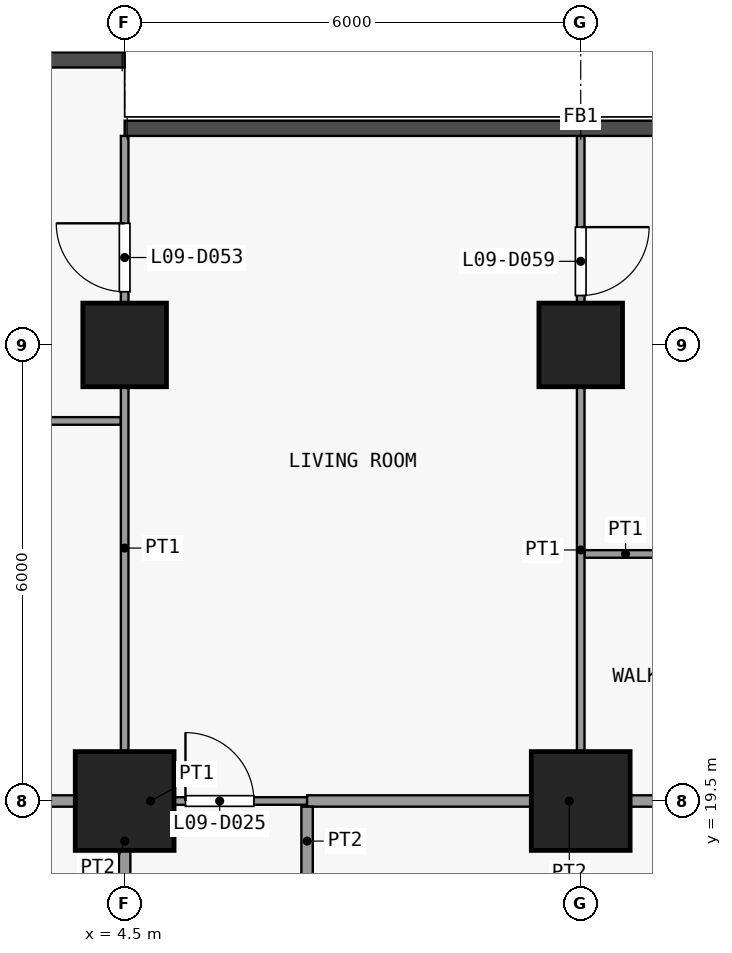
"""IFC4 building model, lengths in metres.
Left out: names, types, materials, properties, quantities, classifications, styles, units other than length and angle.
Written with IfcOpenShell. Run it as: python <this file> out.ifc"""

import sys

from ifc_helpers import new_model, si_unit, direction, frame, frame_2d, origin, origin_2d, place, context, subcontext, project, spatial, rectangle, extrude, element, fill, save


model = new_model("IFC4")
c1 = context("Model", 3, precision=1e-05, world=origin(), true_north=direction((0.0, 1.0)))
c2 = subcontext(c1, "Body", "Model", "MODEL_VIEW")
j1 = project(units=[si_unit("LENGTHUNIT", "METRE"), si_unit("PLANEANGLEUNIT", "RADIAN")], contexts=[c1])
p1 = place(None, origin())
s1 = spatial("IfcSite", under=j1, at=p1, CompositionType="ELEMENT")
p2 = place(p1, origin())
s2 = spatial("IfcBuilding", under=s1, at=p2, CompositionType="ELEMENT")
p3 = place(p2, frame((0.0, 0.0, 43.3)))
s3 = spatial("IfcBuildingStorey", under=s2, at=p3, CompositionType="ELEMENT", Elevation=43.3)
p4 = place(p3, frame((4.5, 19.5, 0.0), z_axis=(0.0, 0.0, 1.0), x_axis=(1.0, 0.0, 0.0)))
e1 = element("IfcColumn", 1, at=p4, inside=s3, PredefinedType="COLUMN", context=c2, shape_type="SweptSolid", body=[
    extrude(rectangle(XDim=1.3, YDim=1.3, at=origin_2d()), origin(), (0.0, 0.0, 1.0), 3.6),
])
p5 = place(p3, frame((4.5, 25.5, 0.0), z_axis=(0.0, 0.0, 1.0), x_axis=(1.0, 0.0, 0.0)))
e2 = element("IfcColumn", 2, at=p5, inside=s3, PredefinedType="COLUMN", context=c2, shape_type="SweptSolid", body=[
    extrude(rectangle(XDim=1.1, YDim=1.1, at=origin_2d()), origin(), (0.0, 0.0, 1.0), 3.6),
])
p6 = place(p3, frame((10.5, 19.5, 0.0), z_axis=(0.0, 0.0, 1.0), x_axis=(1.0, 0.0, 0.0)))
e3 = element("IfcColumn", 3, at=p6, inside=s3, PredefinedType="COLUMN", context=c2, shape_type="SweptSolid", body=[
    extrude(rectangle(XDim=1.3, YDim=1.3, at=origin_2d()), origin(), (0.0, 0.0, 1.0), 3.6),
])
p7 = place(p3, frame((10.5, 25.5, 0.0), z_axis=(0.0, 0.0, 1.0), x_axis=(1.0, 0.0, 0.0)))
e4 = element("IfcColumn", 4, at=p7, inside=s3, PredefinedType="COLUMN", context=c2, shape_type="SweptSolid", body=[
    extrude(rectangle(XDim=1.1, YDim=1.1, at=origin_2d()), origin(), (0.0, 0.0, 1.0), 3.6),
])
p8 = place(p3, frame((4.5, 19.5, 0.0), z_axis=(0.0, 0.0, 1.0), x_axis=(1.0, 0.0, 0.0)))
e5 = element("IfcWall", 5, at=p8, inside=s3, PredefinedType="PARTITIONING", context=c2, shape_type="SweptSolid", body=[
    extrude(rectangle(XDim=2.4, YDim=0.1, at=frame_2d((1.2, 0.0))), origin(), (0.0, 0.0, 1.0), 3.3),
])
p9 = place(p8, frame((0.8, 0.0, 0.0)))
e6 = element("IfcOpeningElement", 6, at=p9, cuts=e5, PredefinedType="OPENING", context=c2, shape_type="SweptSolid", body=[
    extrude(rectangle(XDim=0.9, YDim=2.1, at=frame_2d((0.45, 1.05))), frame((0.0, 0.06, 0.0), z_axis=(0.0, -1.0, 0.0), x_axis=(1.0, 0.0, 0.0)), (0.0, 0.0, 1.0), 0.12),
])
p10 = place(p3, frame((-2.75, 19.5, 0.0), z_axis=(0.0, 0.0, 1.0), x_axis=(1.0, 0.0, 0.0)))
e7 = element("IfcWall", 7, at=p10, inside=s3, PredefinedType="PARTITIONING", context=c2, shape_type="SweptSolid", body=[
    extrude(rectangle(XDim=7.25, YDim=0.15, at=frame_2d((3.625, 0.0))), origin(), (0.0, 0.0, 1.0), 3.3),
])
p11 = place(p3, frame((6.9, 19.5, 0.0), z_axis=(0.0, 0.0, 1.0), x_axis=(1.0, 0.0, 0.0)))
e8 = element("IfcWall", 8, at=p11, inside=s3, PredefinedType="PARTITIONING", context=c2, shape_type="SweptSolid", body=[
    extrude(rectangle(XDim=6.9, YDim=0.15, at=frame_2d((3.45, 0.0))), origin(), (0.0, 0.0, 1.0), 3.3),
])
p12 = place(p3, frame((10.55, 22.75, 0.0), z_axis=(0.0, 0.0, 1.0), x_axis=(1.0, 0.0, 0.0)))
e9 = element("IfcWall", 9, at=p12, inside=s3, PredefinedType="PARTITIONING", context=c2, shape_type="SweptSolid", body=[
    extrude(rectangle(XDim=3.25, YDim=0.1, at=frame_2d((1.625, 0.0))), origin(), (0.0, 0.0, 1.0), 3.3),
])
p13 = place(p12, frame((1.2, 0.0, 0.0)))
e10 = element("IfcOpeningElement", 10, at=p13, cuts=e9, PredefinedType="OPENING", context=c2, shape_type="SweptSolid", body=[
    extrude(rectangle(XDim=0.9, YDim=2.1, at=frame_2d((0.45, 1.05))), frame((0.0, 0.06, 0.0), z_axis=(0.0, -1.0, 0.0), x_axis=(1.0, 0.0, 0.0)), (0.0, 0.0, 1.0), 0.12),
])
p14 = place(p3, frame((-4.4, 24.5, 0.0), z_axis=(0.0, 0.0, 1.0), x_axis=(1.0, 0.0, 0.0)))
e11 = element("IfcWall", 11, at=p14, inside=s3, PredefinedType="PARTITIONING", context=c2, shape_type="SweptSolid", body=[
    extrude(rectangle(XDim=8.85, YDim=0.1, at=frame_2d((4.425, 0.0))), origin(), (0.0, 0.0, 1.0), 3.3),
])
p15 = place(p14, frame((4.0, 0.0, 0.0)))
e12 = element("IfcOpeningElement", 12, at=p15, cuts=e11, PredefinedType="OPENING", context=c2, shape_type="SweptSolid", body=[
    extrude(rectangle(XDim=0.9, YDim=2.1, at=frame_2d((0.45, 1.05))), frame((0.0, 0.06, 0.0), z_axis=(0.0, -1.0, 0.0), x_axis=(1.0, 0.0, 0.0)), (0.0, 0.0, 1.0), 0.12),
])
p16 = place(p3, frame((4.5, 19.575, 0.0), z_axis=(0.0, 0.0, 1.0), x_axis=(0.0, 1.0, 0.0)))
e13 = element("IfcWall", 13, at=p16, inside=s3, PredefinedType="PARTITIONING", context=c2, shape_type="SweptSolid", body=[
    extrude(rectangle(XDim=8.675, YDim=0.1, at=frame_2d((4.337, 0.0))), origin(), (0.0, 0.0, 1.0), 3.3),
])
p17 = place(p16, frame((6.625, 0.0, 0.0)))
e14 = element("IfcOpeningElement", 14, at=p17, cuts=e13, PredefinedType="OPENING", context=c2, shape_type="SweptSolid", body=[
    extrude(rectangle(XDim=0.9, YDim=2.1, at=frame_2d((0.45, 1.05))), frame((0.0, 0.06, 0.0), z_axis=(0.0, -1.0, 0.0), x_axis=(1.0, 0.0, 0.0)), (0.0, 0.0, 1.0), 0.12),
])
p18 = place(p3, frame((4.5, 16.6, 0.0), z_axis=(0.0, 0.0, 1.0), x_axis=(0.0, 1.0, 0.0)))
e15 = element("IfcWall", 15, at=p18, inside=s3, PredefinedType="PARTITIONING", context=c2, shape_type="SweptSolid", body=[
    extrude(rectangle(XDim=2.825, YDim=0.15, at=frame_2d((1.413, 0.0))), origin(), (0.0, 0.0, 1.0), 3.3),
])
p19 = place(p18, frame((0.9, 0.0, 0.0)))
e16 = element("IfcOpeningElement", 16, at=p19, cuts=e15, PredefinedType="OPENING", context=c2, shape_type="SweptSolid", body=[
    extrude(rectangle(XDim=0.9, YDim=2.1, at=frame_2d((0.45, 1.05))), frame((0.0, 0.085, 0.0), z_axis=(0.0, -1.0, 0.0), x_axis=(1.0, 0.0, 0.0)), (0.0, 0.0, 1.0), 0.17),
])
p20 = place(p3, frame((6.9, 16.6, 0.0), z_axis=(0.0, 0.0, 1.0), x_axis=(0.0, 1.0, 0.0)))
e17 = element("IfcWall", 17, at=p20, inside=s3, PredefinedType="PARTITIONING", context=c2, shape_type="SweptSolid", body=[
    extrude(rectangle(XDim=2.825, YDim=0.15, at=frame_2d((1.413, 0.0))), origin(), (0.0, 0.0, 1.0), 3.3),
])
p21 = place(p20, frame((0.9, 0.0, 0.0)))
e18 = element("IfcOpeningElement", 18, at=p21, cuts=e17, PredefinedType="OPENING", context=c2, shape_type="SweptSolid", body=[
    extrude(rectangle(XDim=0.9, YDim=2.1, at=frame_2d((0.45, 1.05))), frame((0.0, 0.085, 0.0), z_axis=(0.0, -1.0, 0.0), x_axis=(1.0, 0.0, 0.0)), (0.0, 0.0, 1.0), 0.17),
])
p22 = place(p3, frame((10.5, 19.575, 0.0), z_axis=(0.0, 0.0, 1.0), x_axis=(0.0, 1.0, 0.0)))
e19 = element("IfcWall", 19, at=p22, inside=s3, PredefinedType="PARTITIONING", context=c2, shape_type="SweptSolid", body=[
    extrude(rectangle(XDim=8.675, YDim=0.1, at=frame_2d((4.337, 0.0))), origin(), (0.0, 0.0, 1.0), 3.3),
])
p23 = place(p22, frame((6.575, 0.0, 0.0)))
e20 = element("IfcOpeningElement", 20, at=p23, cuts=e19, PredefinedType="OPENING", context=c2, shape_type="SweptSolid", body=[
    extrude(rectangle(XDim=0.9, YDim=2.1, at=frame_2d((0.45, 1.05))), frame((0.0, 0.06, 0.0), z_axis=(0.0, -1.0, 0.0), x_axis=(1.0, 0.0, 0.0)), (0.0, 0.0, 1.0), 0.12),
])
p24 = place(p9, origin())
e21 = element("IfcDoor", 21, at=p24, inside=s3, OperationType="SINGLE_SWING_RIGHT", PredefinedType="DOOR", context=c2, shape_type="SweptSolid", body=[
    extrude(rectangle(XDim=0.9, YDim=2.1, at=frame_2d((0.45, 1.05))), frame((0.0, 0.025, 0.0), z_axis=(0.0, -1.0, 0.0), x_axis=(1.0, 0.0, 0.0)), (0.0, 0.0, 1.0), 0.05),
])
fill(e6, e21)
p25 = place(p17, origin())
e22 = element("IfcDoor", 22, at=p25, inside=s3, OperationType="SINGLE_SWING_LEFT", PredefinedType="DOOR", context=c2, shape_type="SweptSolid", body=[
    extrude(rectangle(XDim=0.9, YDim=2.1, at=frame_2d((0.45, 1.05))), frame((0.0, 0.025, 0.0), z_axis=(0.0, -1.0, 0.0), x_axis=(1.0, 0.0, 0.0)), (0.0, 0.0, 1.0), 0.05),
])
fill(e14, e22)
p26 = place(p23, origin())
e23 = element("IfcDoor", 23, at=p26, inside=s3, OperationType="SINGLE_SWING_RIGHT", PredefinedType="DOOR", context=c2, shape_type="SweptSolid", body=[
    extrude(rectangle(XDim=0.9, YDim=2.1, at=frame_2d((0.45, 1.05))), frame((0.0, 0.025, 0.0), z_axis=(0.0, -1.0, 0.0), x_axis=(1.0, 0.0, 0.0)), (0.0, 0.0, 1.0), 0.05),
])
fill(e20, e23)
save(model, sys.argv[1])
